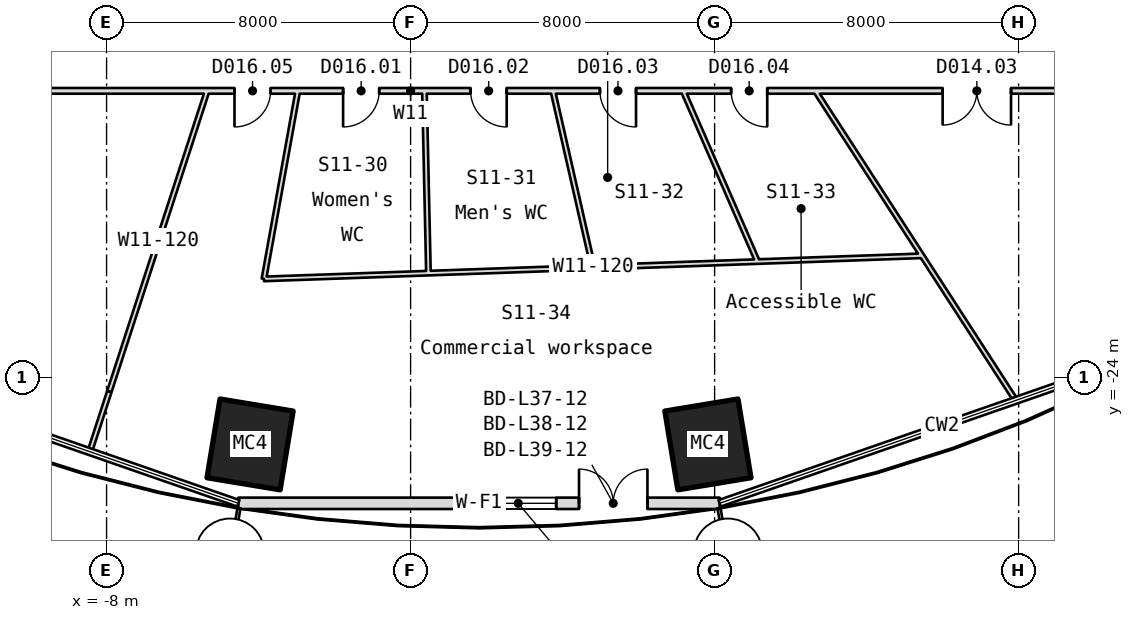
"""IFC4 building model, lengths in metres.
Left out: names, types, materials, properties, quantities, classifications, styles, units other than length and angle.
Written with IfcOpenShell. Run it as: python <this file> out.ifc"""

import sys

from ifc_helpers import new_model, si_unit, direction, frame, frame_2d, origin, origin_2d, place, context, subcontext, project, spatial, rectangle, hollow_rectangle, extrude, element, fill, save


model = new_model("IFC4")
c1 = context("Model", 3, precision=1e-05, world=origin(), true_north=direction((0.0, 1.0)))
c2 = subcontext(c1, "Body", "Model", "MODEL_VIEW")
j1 = project(units=[si_unit("LENGTHUNIT", "METRE"), si_unit("PLANEANGLEUNIT", "RADIAN")], contexts=[c1])
p1 = place(None, origin())
s1 = spatial("IfcSite", under=j1, at=p1, CompositionType="ELEMENT")
p2 = place(p1, origin())
s2 = spatial("IfcBuilding", under=s1, at=p2, CompositionType="ELEMENT")
p3 = place(p2, frame((0.0, 0.0, 173.5)))
s3 = spatial("IfcBuildingStorey", under=s2, at=p3, CompositionType="ELEMENT", Elevation=173.5)
for number, where, z_axis, x_axis in (
    (1, (-4.224, -25.753, -0.18), (0.0, 0.0, 1.0), (-0.987, 0.163, 0.0)),
    (2, (7.824, -25.753, -0.18), (0.0, 0.0, 1.0), (-0.987, -0.163, 0.0)),
):
    element("IfcColumn", number, at=place(p3, frame(where, z_axis=z_axis, x_axis=x_axis)), inside=s3, PredefinedType="COLUMN", context=c2, shape_type="SweptSolid", body=[
        extrude(hollow_rectangle(XDim=1.95, YDim=2.1, WallThickness=0.075, at=origin_2d()), origin(), (0.0, 0.0, 1.0), 4.15),
    ])
p4 = place(p3, frame((-4.532, -27.303, 0.0), z_axis=(0.0, 0.0, 1.0), x_axis=(1.0, 0.0, 0.0)))
e3 = element("IfcWall", 3, at=p4, inside=s3, PredefinedType="SOLIDWALL", context=c2, shape_type="SweptSolid", body=[
    extrude(rectangle(XDim=12.664, YDim=0.3, at=frame_2d((6.332, 0.0))), origin(), (0.0, 0.0, 1.0), 3.97),
])
p5 = place(p4, frame((8.964, 0.0, 0.0)))
e4 = element("IfcOpeningElement", 4, at=p5, cuts=e3, PredefinedType="OPENING", context=c2, shape_type="SweptSolid", body=[
    extrude(rectangle(XDim=1.8, YDim=2.4, at=frame_2d((0.9, 1.2))), frame((0.0, 0.16, 0.0), z_axis=(0.0, -1.0, 0.0), x_axis=(1.0, 0.0, 0.0)), (0.0, 0.0, 1.0), 0.32),
])
p6 = place(p4, frame((6.364, 0.0, 0.9)))
e5 = element("IfcOpeningElement", 5, at=p6, cuts=e3, PredefinedType="OPENING", context=c2, shape_type="SweptSolid", body=[
    extrude(rectangle(XDim=2.0, YDim=1.5, at=frame_2d((1.0, 0.75))), frame((0.0, 0.16, 0.0), z_axis=(0.0, -1.0, 0.0), x_axis=(1.0, 0.0, 0.0)), (0.0, 0.0, 1.0), 0.32),
])
p7 = place(p3, frame((-5.352, -16.45, 0.0), z_axis=(0.0, 0.0, 1.0), x_axis=(-0.309412606948, -0.950927882997, 0.0)))
e6 = element("IfcWall", 6, at=p7, inside=s3, PredefinedType="PARTITIONING", context=c2, shape_type="SweptSolid", body=[
    extrude(rectangle(XDim=8.317, YDim=0.12, at=frame_2d((4.159, 0.0))), origin(), (0.0, 0.0, 1.0), 3.434),
])
p8 = place(p3, frame((-7.926, -24.359, 0.0), z_axis=(0.0, 0.0, 1.0), x_axis=(-0.30927811653, -0.950971632929, 0.0)))
e7 = element("IfcWall", 7, at=p8, inside=s3, PredefinedType="PARTITIONING", context=c2, shape_type="SweptSolid", body=[
    extrude(rectangle(XDim=1.667, YDim=0.12, at=frame_2d((0.833, 0.0))), origin(), (0.0, 0.0, 1.0), 3.97),
])
p9 = place(p3, frame((-3.86, -21.398, 0.0), z_axis=(0.0, 0.0, 1.0), x_axis=(0.999384014625, 0.035094035277, 0.0)))
e8 = element("IfcWall", 8, at=p9, inside=s3, PredefinedType="PARTITIONING", context=c2, shape_type="SweptSolid", body=[
    extrude(rectangle(XDim=17.329, YDim=0.12, at=frame_2d((8.665, 0.0))), origin(), (0.0, 0.0, 1.0), 3.97),
])
p10 = place(p3, frame((-3.86, -21.398, 0.0), z_axis=(0.0, 0.0, 1.0), x_axis=(0.177509467823, 0.98411909281, 0.0)))
e9 = element("IfcWall", 9, at=p10, inside=s3, PredefinedType="PARTITIONING", context=c2, shape_type="SweptSolid", body=[
    extrude(rectangle(XDim=5.028, YDim=0.12, at=frame_2d((2.514, 0.0))), origin(), (0.0, 0.0, 1.0), 3.97),
])
p11 = place(p3, frame((0.47, -21.247, 0.0), z_axis=(0.0, 0.0, 1.0), x_axis=(-0.022084498944, 0.999756107711, 0.0)))
e10 = element("IfcWall", 10, at=p11, inside=s3, PredefinedType="PARTITIONING", context=c2, shape_type="SweptSolid", body=[
    extrude(rectangle(XDim=4.798, YDim=0.12, at=frame_2d((2.399, 0.0))), origin(), (0.0, 0.0, 1.0), 3.97),
])
p12 = place(p3, frame((4.8, -21.094, 0.0), z_axis=(0.0, 0.0, 1.0), x_axis=(-0.221882505737, 0.975073409364, 0.0)))
e11 = element("IfcWall", 11, at=p12, inside=s3, PredefinedType="PARTITIONING", context=c2, shape_type="SweptSolid", body=[
    extrude(rectangle(XDim=4.763, YDim=0.12, at=frame_2d((2.382, 0.0))), origin(), (0.0, 0.0, 1.0), 3.97),
])
p13 = place(p3, frame((9.129, -20.942, 0.0), z_axis=(0.0, 0.0, 1.0), x_axis=(-0.399629429377, 0.916676780101, 0.0)))
e12 = element("IfcWall", 12, at=p13, inside=s3, PredefinedType="PARTITIONING", context=c2, shape_type="SweptSolid", body=[
    extrude(rectangle(XDim=4.901, YDim=0.12, at=frame_2d((2.45, 0.0))), origin(), (0.0, 0.0, 1.0), 3.97),
])
p14 = place(p3, frame((10.649, -16.45, 0.0), z_axis=(0.0, 0.0, 1.0), x_axis=(0.5434327779, -0.839452688306, 0.0)))
e13 = element("IfcWall", 13, at=p14, inside=s3, PredefinedType="PARTITIONING", context=c2, shape_type="SweptSolid", body=[
    extrude(rectangle(XDim=9.704, YDim=0.12, at=frame_2d((4.852, 0.0))), origin(), (0.0, 0.0, 1.0), 3.97),
])
p15 = place(p3, frame((19.15, -16.45, 0.0), z_axis=(0.0, 0.0, 1.0), x_axis=(-1.0, 0.0, 0.0)))
e14 = element("IfcWall", 14, at=p15, inside=s3, PredefinedType="PARTITIONING", context=c2, shape_type="SweptSolid", body=[
    extrude(rectangle(XDim=38.3, YDim=0.15, at=frame_2d((19.15, 0.0))), origin(), (0.0, 0.0, 1.0), 3.97),
])
p16 = place(p15, frame((19.976, 0.0, 0.0)))
e15 = element("IfcOpeningElement", 15, at=p16, cuts=e14, PredefinedType="OPENING", context=c2, shape_type="SweptSolid", body=[
    extrude(rectangle(XDim=0.95, YDim=2.1, at=frame_2d((0.475, 1.05))), frame((0.0, 0.085, 0.0), z_axis=(0.0, -1.0, 0.0), x_axis=(1.0, 0.0, 0.0)), (0.0, 0.0, 1.0), 0.17),
])
p17 = place(p15, frame((16.621, 0.0, 0.0)))
e16 = element("IfcOpeningElement", 16, at=p17, cuts=e14, PredefinedType="OPENING", context=c2, shape_type="SweptSolid", body=[
    extrude(rectangle(XDim=0.95, YDim=2.1, at=frame_2d((0.475, 1.05))), frame((0.0, 0.085, 0.0), z_axis=(0.0, -1.0, 0.0), x_axis=(1.0, 0.0, 0.0)), (0.0, 0.0, 1.0), 0.17),
])
p18 = place(p15, frame((13.218, 0.0, 0.0)))
e17 = element("IfcOpeningElement", 17, at=p18, cuts=e14, PredefinedType="OPENING", context=c2, shape_type="SweptSolid", body=[
    extrude(rectangle(XDim=0.95, YDim=2.1, at=frame_2d((0.475, 1.05))), frame((0.0, 0.085, 0.0), z_axis=(0.0, -1.0, 0.0), x_axis=(1.0, 0.0, 0.0)), (0.0, 0.0, 1.0), 0.17),
])
p19 = place(p15, frame((9.765, 0.0, 0.0)))
e18 = element("IfcOpeningElement", 18, at=p19, cuts=e14, PredefinedType="OPENING", context=c2, shape_type="SweptSolid", body=[
    extrude(rectangle(XDim=0.95, YDim=2.1, at=frame_2d((0.475, 1.05))), frame((0.0, 0.085, 0.0), z_axis=(0.0, -1.0, 0.0), x_axis=(1.0, 0.0, 0.0)), (0.0, 0.0, 1.0), 0.17),
])
p20 = place(p15, frame((22.834, 0.0, 0.0)))
e19 = element("IfcOpeningElement", 19, at=p20, cuts=e14, PredefinedType="OPENING", context=c2, shape_type="SweptSolid", body=[
    extrude(rectangle(XDim=0.95, YDim=2.1, at=frame_2d((0.475, 1.05))), frame((0.0, 0.085, 0.0), z_axis=(0.0, -1.0, 0.0), x_axis=(1.0, 0.0, 0.0)), (0.0, 0.0, 1.0), 0.17),
])
p21 = place(p15, frame((3.35, 0.0, 0.0)))
e20 = element("IfcOpeningElement", 20, at=p21, cuts=e14, PredefinedType="OPENING", context=c2, shape_type="SweptSolid", body=[
    extrude(rectangle(XDim=1.8, YDim=2.1, at=frame_2d((0.9, 1.05))), frame((0.0, 0.085, 0.0), z_axis=(0.0, -1.0, 0.0), x_axis=(1.0, 0.0, 0.0)), (0.0, 0.0, 1.0), 0.17),
])
p22 = place(p5, origin())
e21 = element("IfcDoor", 21, at=p22, inside=s3, OperationType="SINGLE_SWING_LEFT", PredefinedType="DOOR", context=c2, shape_type="SweptSolid", body=[
    extrude(rectangle(XDim=1.8, YDim=2.4, at=frame_2d((0.9, 1.2))), frame((0.0, 0.025, 0.0), z_axis=(0.0, -1.0, 0.0), x_axis=(1.0, 0.0, 0.0)), (0.0, 0.0, 1.0), 0.05),
])
fill(e4, e21)
p23 = place(p6, origin())
e22 = element("IfcWindow", 22, at=p23, inside=s3, PartitioningType="SINGLE_PANEL", PredefinedType="WINDOW", context=c2, shape_type="SweptSolid", body=[
    extrude(rectangle(XDim=2.0, YDim=1.5, at=frame_2d((1.0, 0.75))), frame((0.0, 0.03, 0.0), z_axis=(0.0, -1.0, 0.0), x_axis=(1.0, 0.0, 0.0)), (0.0, 0.0, 1.0), 0.06),
])
fill(e5, e22)
p24 = place(p16, origin())
e23 = element("IfcDoor", 23, at=p24, inside=s3, OperationType="SINGLE_SWING_RIGHT", PredefinedType="DOOR", context=c2, shape_type="SweptSolid", body=[
    extrude(rectangle(XDim=0.95, YDim=2.1, at=frame_2d((0.475, 1.05))), frame((0.0, 0.025, 0.0), z_axis=(0.0, -1.0, 0.0), x_axis=(1.0, 0.0, 0.0)), (0.0, 0.0, 1.0), 0.05),
])
fill(e15, e23)
p25 = place(p17, origin())
e24 = element("IfcDoor", 24, at=p25, inside=s3, OperationType="SINGLE_SWING_RIGHT", PredefinedType="DOOR", context=c2, shape_type="SweptSolid", body=[
    extrude(rectangle(XDim=0.95, YDim=2.1, at=frame_2d((0.475, 1.05))), frame((0.0, 0.025, 0.0), z_axis=(0.0, -1.0, 0.0), x_axis=(1.0, 0.0, 0.0)), (0.0, 0.0, 1.0), 0.05),
])
fill(e16, e24)
p26 = place(p18, origin())
e25 = element("IfcDoor", 25, at=p26, inside=s3, OperationType="SINGLE_SWING_RIGHT", PredefinedType="DOOR", context=c2, shape_type="SweptSolid", body=[
    extrude(rectangle(XDim=0.95, YDim=2.1, at=frame_2d((0.475, 1.05))), frame((0.0, 0.025, 0.0), z_axis=(0.0, -1.0, 0.0), x_axis=(1.0, 0.0, 0.0)), (0.0, 0.0, 1.0), 0.05),
])
fill(e17, e25)
p27 = place(p19, origin())
e26 = element("IfcDoor", 26, at=p27, inside=s3, OperationType="SINGLE_SWING_RIGHT", PredefinedType="DOOR", context=c2, shape_type="SweptSolid", body=[
    extrude(rectangle(XDim=0.95, YDim=2.1, at=frame_2d((0.475, 1.05))), frame((0.0, 0.025, 0.0), z_axis=(0.0, -1.0, 0.0), x_axis=(1.0, 0.0, 0.0)), (0.0, 0.0, 1.0), 0.05),
])
fill(e18, e26)
p28 = place(p20, origin())
e27 = element("IfcDoor", 27, at=p28, inside=s3, OperationType="SINGLE_SWING_RIGHT", PredefinedType="DOOR", context=c2, shape_type="SweptSolid", body=[
    extrude(rectangle(XDim=0.95, YDim=2.1, at=frame_2d((0.475, 1.05))), frame((0.0, 0.025, 0.0), z_axis=(0.0, -1.0, 0.0), x_axis=(1.0, 0.0, 0.0)), (0.0, 0.0, 1.0), 0.05),
])
fill(e19, e27)
p29 = place(p21, origin())
e28 = element("IfcDoor", 28, at=p29, inside=s3, OperationType="DOUBLE_DOOR_SINGLE_SWING", PredefinedType="DOOR", context=c2, shape_type="SweptSolid", body=[
    extrude(rectangle(XDim=1.8, YDim=2.1, at=frame_2d((0.9, 1.05))), frame((0.0, 0.025, 0.0), z_axis=(0.0, -1.0, 0.0), x_axis=(1.0, 0.0, 0.0)), (0.0, 0.0, 1.0), 0.05),
])
fill(e20, e28)
save(model, sys.argv[1])
